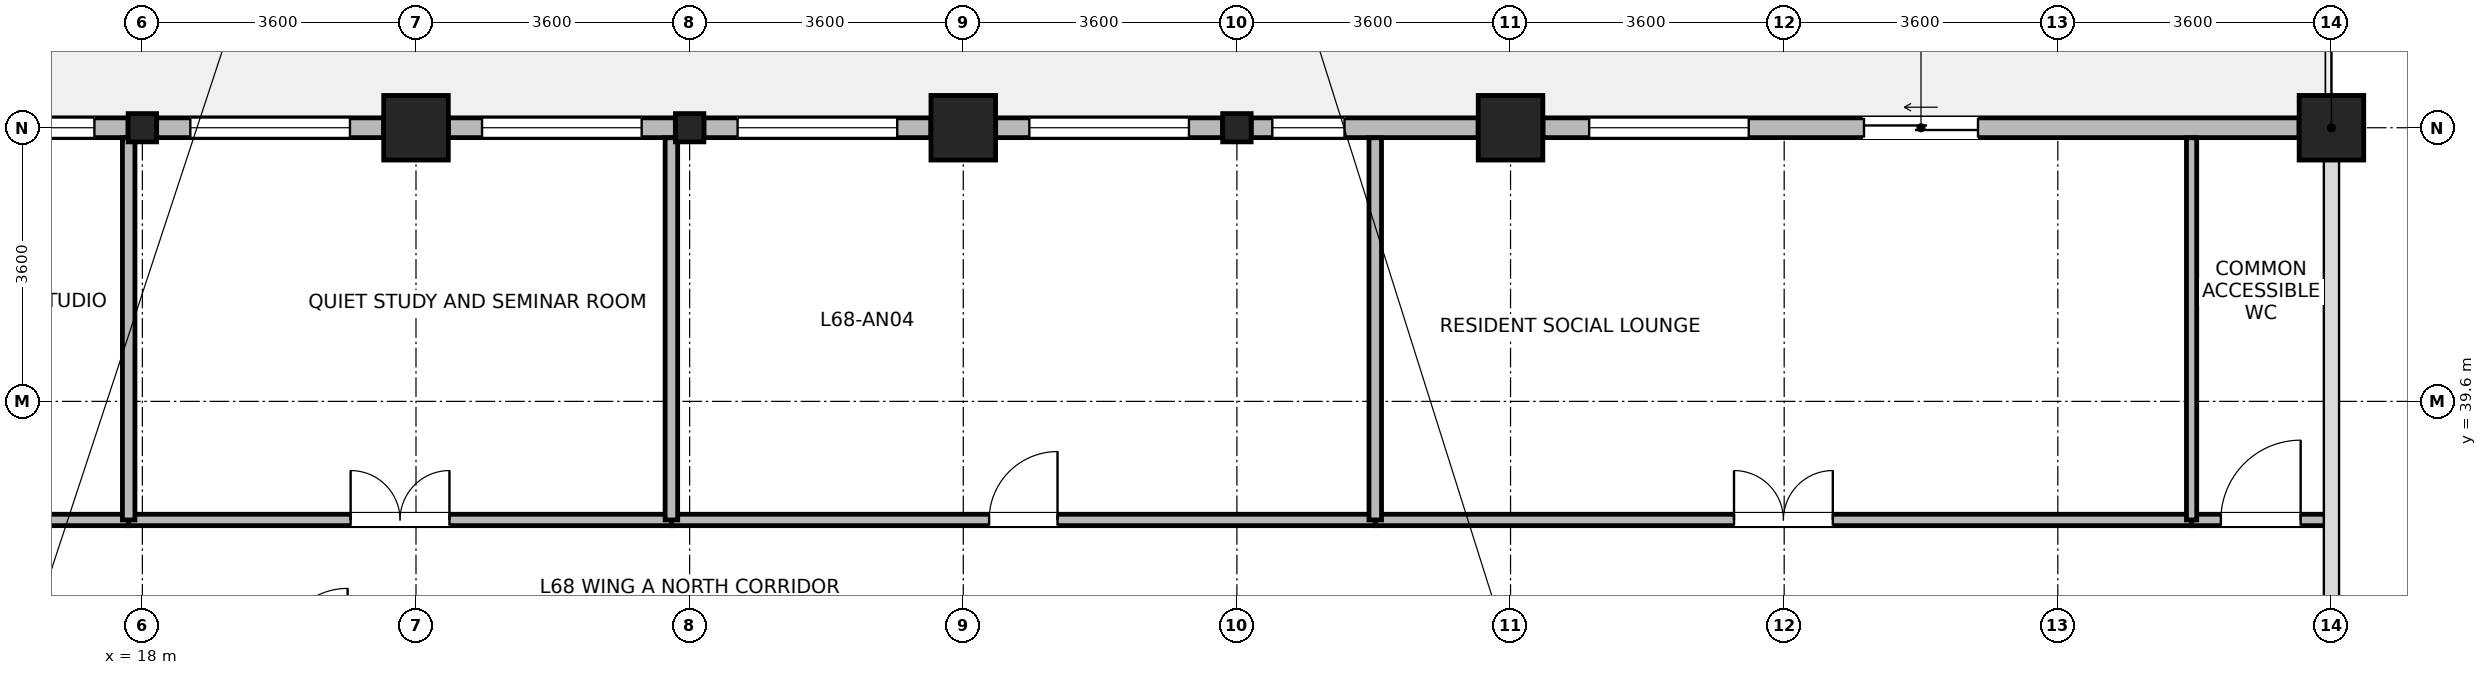
"""IFC4 building model, lengths in metres.
Left out: names, types, materials, properties, quantities, classifications, styles, units other than length and angle.
Written with IfcOpenShell. Run it as: python <this file> out.ifc"""

import sys

from ifc_helpers import new_model, si_unit, direction, frame, frame_2d, origin, origin_2d, place, context, subcontext, project, spatial, rectangle, i_section, extrude, source, transform, mapped, element, fill, save


model = new_model("IFC4")
c1 = context("Model", 3, precision=1e-05, world=origin(), true_north=direction((0.0, 1.0)))
c2 = subcontext(c1, "Body", "Model", "MODEL_VIEW")
j1 = project(units=[si_unit("LENGTHUNIT", "METRE"), si_unit("PLANEANGLEUNIT", "RADIAN")], contexts=[c1])
p1 = place(None, origin())
s1 = spatial("IfcSite", under=j1, at=p1, CompositionType="ELEMENT")
p2 = place(p1, origin())
s2 = spatial("IfcBuilding", under=s1, at=p2, CompositionType="ELEMENT")
p3 = place(p2, frame((0.0, 0.0, 264.7)))
s3 = spatial("IfcBuildingStorey", under=s2, at=p3, CompositionType="ELEMENT", Elevation=264.7)
m1 = source(origin(), c2, "Body", "SweptSolid", [
    extrude(rectangle(XDim=0.85, YDim=0.85, at=origin_2d()), origin(), (0.0, 0.0, 1.0), 3.7),
])
for number, where, z_axis, x_axis in (
    (1, (21.6, 43.2, 0.0), (0.0, 0.0, 1.0), (1.0, 0.0, 0.0)),
    (2, (28.8, 43.2, 0.0), (0.0, 0.0, 1.0), (1.0, 0.0, 0.0)),
    (3, (36.0, 43.2, 0.0), (0.0, 0.0, 1.0), (1.0, 0.0, 0.0)),
    (4, (46.8, 43.2, 0.0), (0.0, 0.0, 1.0), (1.0, 0.0, 0.0)),
):
    element("IfcColumn", number, at=place(p3, frame(where, z_axis=z_axis, x_axis=x_axis)), inside=s3, PredefinedType="COLUMN", context=c2, shape_type="MappedRepresentation", body=[
        mapped(m1, transform((0.0, 0.0, 0.0), x_axis=(1.0, 0.0, 0.0), y_axis=(0.0, 1.0, 0.0), z_axis=(0.0, 0.0, 1.0), scale=1.0)),
    ])
m2 = source(origin(), c2, "Body", "SweptSolid", [
    extrude(i_section(OverallWidth=0.374, OverallDepth=0.372, WebThickness=0.015, FlangeThickness=0.026, FilletRadius=0.015, at=origin_2d()), origin(), (0.0, 0.0, 1.0), 3.7),
])
for number, where, z_axis, x_axis in (
    (5, (18.0, 43.2, 0.0), (0.0, 0.0, 1.0), (1.0, 0.0, 0.0)),
    (6, (25.2, 43.2, 0.0), (0.0, 0.0, 1.0), (1.0, 0.0, 0.0)),
    (7, (32.4, 43.2, 0.0), (0.0, 0.0, 1.0), (1.0, 0.0, 0.0)),
):
    element("IfcColumn", number, at=place(p3, frame(where, z_axis=z_axis, x_axis=x_axis)), inside=s3, PredefinedType="COLUMN", context=c2, shape_type="MappedRepresentation", body=[
        mapped(m2, transform((0.0, 0.0, 0.0), x_axis=(1.0, 0.0, 0.0), y_axis=(0.0, 1.0, 0.0), z_axis=(0.0, 0.0, 1.0), scale=1.0)),
    ])
p4 = place(p3, frame((36.426, 43.2, 0.0), z_axis=(0.0, 0.0, 1.0), x_axis=(1.0, 0.0, 0.0)))
e8 = element("IfcWall", 8, at=p4, inside=s3, PredefinedType="STANDARD", context=c2, shape_type="SweptSolid", body=[
    extrude(rectangle(XDim=9.948, YDim=0.26, at=frame_2d((4.974, 0.0))), origin(), (0.0, 0.0, 1.0), 3.055),
])
p5 = place(p4, frame((4.224, 0.0, 0.0)))
e9 = element("IfcOpeningElement", 9, at=p5, cuts=e8, PredefinedType="OPENING", context=c2, shape_type="SweptSolid", body=[
    extrude(rectangle(XDim=1.5, YDim=2.15, at=frame_2d((0.75, 1.075))), frame((0.0, 0.14, 0.0), z_axis=(0.0, -1.0, 0.0), x_axis=(1.0, 0.0, 0.0)), (0.0, 0.0, 1.0), 0.28),
])
p6 = place(p4, frame((0.608, 0.0, 0.85)))
e10 = element("IfcOpeningElement", 10, at=p6, cuts=e8, PredefinedType="OPENING", context=c2, shape_type="SweptSolid", body=[
    extrude(rectangle(XDim=2.1, YDim=1.95, at=frame_2d((1.05, 0.975))), frame((0.0, 0.14, 0.0), z_axis=(0.0, -1.0, 0.0), x_axis=(1.0, 0.0, 0.0)), (0.0, 0.0, 1.0), 0.28),
])
p7 = place(p3, frame((32.588, 43.2, 0.0), z_axis=(0.0, 0.0, 1.0), x_axis=(1.0, 0.0, 0.0)))
e11 = element("IfcWall", 11, at=p7, inside=s3, PredefinedType="STANDARD", context=c2, shape_type="SweptSolid", body=[
    extrude(rectangle(XDim=2.986, YDim=0.26, at=frame_2d((1.493, 0.0))), origin(), (0.0, 0.0, 1.0), 3.055),
])
p8 = place(p7, frame((0.278, 0.0, 0.85)))
e12 = element("IfcOpeningElement", 12, at=p8, cuts=e11, PredefinedType="OPENING", context=c2, shape_type="SweptSolid", body=[
    extrude(rectangle(XDim=0.95, YDim=1.75, at=frame_2d((0.475, 0.875))), frame((0.0, 0.14, 0.0), z_axis=(0.0, -1.0, 0.0), x_axis=(1.0, 0.0, 0.0)), (0.0, 0.0, 1.0), 0.28),
])
p9 = place(p3, frame((29.226, 43.2, 0.0), z_axis=(0.0, 0.0, 1.0), x_axis=(1.0, 0.0, 0.0)))
e13 = element("IfcWall", 13, at=p9, inside=s3, PredefinedType="STANDARD", context=c2, shape_type="SweptSolid", body=[
    extrude(rectangle(XDim=2.986, YDim=0.26, at=frame_2d((1.493, 0.0))), origin(), (0.0, 0.0, 1.0), 3.055),
])
p10 = place(p9, frame((0.443, 0.0, 0.85)))
e14 = element("IfcOpeningElement", 14, at=p10, cuts=e13, PredefinedType="OPENING", context=c2, shape_type="SweptSolid", body=[
    extrude(rectangle(XDim=2.1, YDim=1.95, at=frame_2d((1.05, 0.975))), frame((0.0, 0.14, 0.0), z_axis=(0.0, -1.0, 0.0), x_axis=(1.0, 0.0, 0.0)), (0.0, 0.0, 1.0), 0.28),
])
p11 = place(p3, frame((25.388, 43.2, 0.0), z_axis=(0.0, 0.0, 1.0), x_axis=(1.0, 0.0, 0.0)))
e15 = element("IfcWall", 15, at=p11, inside=s3, PredefinedType="STANDARD", context=c2, shape_type="SweptSolid", body=[
    extrude(rectangle(XDim=2.986, YDim=0.26, at=frame_2d((1.493, 0.0))), origin(), (0.0, 0.0, 1.0), 3.055),
])
p12 = place(p11, frame((0.443, 0.0, 0.85)))
e16 = element("IfcOpeningElement", 16, at=p12, cuts=e15, PredefinedType="OPENING", context=c2, shape_type="SweptSolid", body=[
    extrude(rectangle(XDim=2.1, YDim=1.95, at=frame_2d((1.05, 0.975))), frame((0.0, 0.14, 0.0), z_axis=(0.0, -1.0, 0.0), x_axis=(1.0, 0.0, 0.0)), (0.0, 0.0, 1.0), 0.28),
])
p13 = place(p3, frame((22.026, 43.2, 0.0), z_axis=(0.0, 0.0, 1.0), x_axis=(1.0, 0.0, 0.0)))
e17 = element("IfcWall", 17, at=p13, inside=s3, PredefinedType="STANDARD", context=c2, shape_type="SweptSolid", body=[
    extrude(rectangle(XDim=2.986, YDim=0.26, at=frame_2d((1.493, 0.0))), origin(), (0.0, 0.0, 1.0), 3.055),
])
p14 = place(p13, frame((0.443, 0.0, 0.85)))
e18 = element("IfcOpeningElement", 18, at=p14, cuts=e17, PredefinedType="OPENING", context=c2, shape_type="SweptSolid", body=[
    extrude(rectangle(XDim=2.1, YDim=1.95, at=frame_2d((1.05, 0.975))), frame((0.0, 0.14, 0.0), z_axis=(0.0, -1.0, 0.0), x_axis=(1.0, 0.0, 0.0)), (0.0, 0.0, 1.0), 0.28),
])
p15 = place(p3, frame((18.188, 43.2, 0.0), z_axis=(0.0, 0.0, 1.0), x_axis=(1.0, 0.0, 0.0)))
e19 = element("IfcWall", 19, at=p15, inside=s3, PredefinedType="STANDARD", context=c2, shape_type="SweptSolid", body=[
    extrude(rectangle(XDim=2.986, YDim=0.26, at=frame_2d((1.493, 0.0))), origin(), (0.0, 0.0, 1.0), 3.055),
])
p16 = place(p15, frame((0.443, 0.0, 0.85)))
e20 = element("IfcOpeningElement", 20, at=p16, cuts=e19, PredefinedType="OPENING", context=c2, shape_type="SweptSolid", body=[
    extrude(rectangle(XDim=2.1, YDim=1.95, at=frame_2d((1.05, 0.975))), frame((0.0, 0.14, 0.0), z_axis=(0.0, -1.0, 0.0), x_axis=(1.0, 0.0, 0.0)), (0.0, 0.0, 1.0), 0.28),
])
p17 = place(p3, frame((14.826, 43.2, 0.0), z_axis=(0.0, 0.0, 1.0), x_axis=(1.0, 0.0, 0.0)))
e21 = element("IfcWall", 21, at=p17, inside=s3, PredefinedType="STANDARD", context=c2, shape_type="SweptSolid", body=[
    extrude(rectangle(XDim=2.986, YDim=0.26, at=frame_2d((1.493, 0.0))), origin(), (0.0, 0.0, 1.0), 3.055),
])
p18 = place(p17, frame((0.443, 0.0, 0.85)))
e22 = element("IfcOpeningElement", 22, at=p18, cuts=e21, PredefinedType="OPENING", context=c2, shape_type="SweptSolid", body=[
    extrude(rectangle(XDim=2.1, YDim=1.95, at=frame_2d((1.05, 0.975))), frame((0.0, 0.14, 0.0), z_axis=(0.0, -1.0, 0.0), x_axis=(1.0, 0.0, 0.0)), (0.0, 0.0, 1.0), 0.28),
])
p19 = place(p3, frame((34.22, 38.04, 0.0), z_axis=(0.0, 0.0, 1.0), x_axis=(1.0, 0.0, 0.0)))
e23 = element("IfcWall", 23, at=p19, inside=s3, PredefinedType="PARTITIONING", context=c2, shape_type="SweptSolid", body=[
    extrude(rectangle(XDim=10.74, YDim=0.15, at=frame_2d((5.37, 0.0))), origin(), (0.0, 0.0, 1.0), 3.455),
])
p20 = place(p19, frame((4.72, 0.0, 0.0)))
e24 = element("IfcOpeningElement", 24, at=p20, cuts=e23, PredefinedType="OPENING", context=c2, shape_type="SweptSolid", body=[
    extrude(rectangle(XDim=1.3, YDim=2.12, at=frame_2d((0.65, 1.06))), frame((0.0, 0.085, 0.0), z_axis=(0.0, -1.0, 0.0), x_axis=(1.0, 0.0, 0.0)), (0.0, 0.0, 1.0), 0.17),
])
p21 = place(p3, frame((24.96, 38.04, 0.0), z_axis=(0.0, 0.0, 1.0), x_axis=(1.0, 0.0, 0.0)))
e25 = element("IfcWall", 25, at=p21, inside=s3, PredefinedType="PARTITIONING", context=c2, shape_type="SweptSolid", body=[
    extrude(rectangle(XDim=9.26, YDim=0.15, at=frame_2d((4.63, 0.0))), origin(), (0.0, 0.0, 1.0), 3.455),
])
p22 = place(p21, frame((4.18, 0.0, 0.0)))
e26 = element("IfcOpeningElement", 26, at=p22, cuts=e25, PredefinedType="OPENING", context=c2, shape_type="SweptSolid", body=[
    extrude(rectangle(XDim=0.9, YDim=2.08, at=frame_2d((0.45, 1.04))), frame((0.0, 0.085, 0.0), z_axis=(0.0, -1.0, 0.0), x_axis=(1.0, 0.0, 0.0)), (0.0, 0.0, 1.0), 0.17),
])
p23 = place(p3, frame((10.12, 38.04, 0.0), z_axis=(0.0, 0.0, 1.0), x_axis=(1.0, 0.0, 0.0)))
e27 = element("IfcWall", 27, at=p23, inside=s3, PredefinedType="PARTITIONING", context=c2, shape_type="SweptSolid", body=[
    extrude(rectangle(XDim=7.7, YDim=0.15, at=frame_2d((3.85, 0.0))), origin(), (0.0, 0.0, 1.0), 3.455),
])
p24 = place(p23, frame((3.325, 0.0, 0.0)))
e28 = element("IfcOpeningElement", 28, at=p24, cuts=e27, PredefinedType="OPENING", context=c2, shape_type="SweptSolid", body=[
    extrude(rectangle(XDim=1.05, YDim=2.12, at=frame_2d((0.525, 1.06))), frame((0.0, 0.085, 0.0), z_axis=(0.0, -1.0, 0.0), x_axis=(1.0, 0.0, 0.0)), (0.0, 0.0, 1.0), 0.17),
])
p25 = place(p3, frame((17.82, 38.04, 0.0), z_axis=(0.0, 0.0, 1.0), x_axis=(1.0, 0.0, 0.0)))
e29 = element("IfcWall", 29, at=p25, inside=s3, PredefinedType="PARTITIONING", context=c2, shape_type="SweptSolid", body=[
    extrude(rectangle(XDim=7.14, YDim=0.15, at=frame_2d((3.57, 0.0))), origin(), (0.0, 0.0, 1.0), 3.455),
])
p26 = place(p25, frame((2.92, 0.0, 0.0)))
e30 = element("IfcOpeningElement", 30, at=p26, cuts=e29, PredefinedType="OPENING", context=c2, shape_type="SweptSolid", body=[
    extrude(rectangle(XDim=1.3, YDim=2.12, at=frame_2d((0.65, 1.06))), frame((0.0, 0.085, 0.0), z_axis=(0.0, -1.0, 0.0), x_axis=(1.0, 0.0, 0.0)), (0.0, 0.0, 1.0), 0.17),
])
p27 = place(p3, frame((44.96, 38.04, 0.0), z_axis=(0.0, 0.0, 1.0), x_axis=(1.0, 0.0, 0.0)))
e31 = element("IfcWall", 31, at=p27, inside=s3, PredefinedType="PARTITIONING", context=c2, shape_type="SweptSolid", body=[
    extrude(rectangle(XDim=1.82, YDim=0.15, at=frame_2d((0.91, 0.0))), origin(), (0.0, 0.0, 1.0), 3.455),
])
p28 = place(p27, frame((0.385, 0.0, 0.0)))
e32 = element("IfcOpeningElement", 32, at=p28, cuts=e31, PredefinedType="OPENING", context=c2, shape_type="SweptSolid", body=[
    extrude(rectangle(XDim=1.05, YDim=2.12, at=frame_2d((0.525, 1.06))), frame((0.0, 0.085, 0.0), z_axis=(0.0, -1.0, 0.0), x_axis=(1.0, 0.0, 0.0)), (0.0, 0.0, 1.0), 0.17),
])
p29 = place(p3, frame((17.82, 38.04, 0.0), z_axis=(0.0, 0.0, 1.0), x_axis=(0.0, 1.0, 0.0)))
e33 = element("IfcWall", 33, at=p29, inside=s3, PredefinedType="PARTITIONING", context=c2, shape_type="SweptSolid", body=[
    extrude(rectangle(XDim=5.028, YDim=0.165, at=frame_2d((2.514, 0.0))), origin(), (0.0, 0.0, 1.0), 3.185),
])
for number, where, z_axis, x_axis in (
    (34, (24.96, 38.04, 0.0), (0.0, 0.0, 1.0), (0.0, 1.0, 0.0)),
    (35, (34.22, 38.04, 0.0), (0.0, 0.0, 1.0), (0.0, 1.0, 0.0)),
):
    element("IfcWall", number, at=place(p3, frame(where, z_axis=z_axis, x_axis=x_axis)), inside=s3, PredefinedType="PARTITIONING", context=c2, shape_type="SweptSolid", body=[
        extrude(rectangle(XDim=5.028, YDim=0.165, at=frame_2d((2.514, 0.0))), origin(), (0.0, 0.0, 1.0), 3.455),
    ])
p30 = place(p3, frame((44.96, 38.04, 0.0), z_axis=(0.0, 0.0, 1.0), x_axis=(0.0, 1.0, 0.0)))
e36 = element("IfcWall", 36, at=p30, inside=s3, PredefinedType="PARTITIONING", context=c2, shape_type="SweptSolid", body=[
    extrude(rectangle(XDim=5.028, YDim=0.135, at=frame_2d((2.514, 0.0))), origin(), (0.0, 0.0, 1.0), 3.455),
])
p31 = place(p5, origin())
e37 = element("IfcDoor", 37, at=p31, inside=s3, OperationType="SLIDING_TO_LEFT", PredefinedType="DOOR", context=c2, shape_type="SweptSolid", body=[
    extrude(rectangle(XDim=1.5, YDim=2.15, at=frame_2d((0.75, 1.075))), frame((0.0, 0.025, 0.0), z_axis=(0.0, -1.0, 0.0), x_axis=(1.0, 0.0, 0.0)), (0.0, 0.0, 1.0), 0.05),
])
fill(e9, e37)
p32 = place(p6, origin())
e38 = element("IfcWindow", 38, at=p32, inside=s3, PartitioningType="SINGLE_PANEL", PredefinedType="WINDOW", context=c2, shape_type="SweptSolid", body=[
    extrude(rectangle(XDim=2.1, YDim=1.95, at=frame_2d((1.05, 0.975))), frame((0.0, 0.03, 0.0), z_axis=(0.0, -1.0, 0.0), x_axis=(1.0, 0.0, 0.0)), (0.0, 0.0, 1.0), 0.06),
])
fill(e10, e38)
p33 = place(p8, origin())
e39 = element("IfcWindow", 39, at=p33, inside=s3, PartitioningType="SINGLE_PANEL", PredefinedType="WINDOW", context=c2, shape_type="SweptSolid", body=[
    extrude(rectangle(XDim=0.95, YDim=1.75, at=frame_2d((0.475, 0.875))), frame((0.0, 0.03, 0.0), z_axis=(0.0, -1.0, 0.0), x_axis=(1.0, 0.0, 0.0)), (0.0, 0.0, 1.0), 0.06),
])
fill(e12, e39)
p34 = place(p10, origin())
e40 = element("IfcWindow", 40, at=p34, inside=s3, PartitioningType="SINGLE_PANEL", PredefinedType="WINDOW", context=c2, shape_type="SweptSolid", body=[
    extrude(rectangle(XDim=2.1, YDim=1.95, at=frame_2d((1.05, 0.975))), frame((0.0, 0.03, 0.0), z_axis=(0.0, -1.0, 0.0), x_axis=(1.0, 0.0, 0.0)), (0.0, 0.0, 1.0), 0.06),
])
fill(e14, e40)
p35 = place(p12, origin())
e41 = element("IfcWindow", 41, at=p35, inside=s3, PartitioningType="SINGLE_PANEL", PredefinedType="WINDOW", context=c2, shape_type="SweptSolid", body=[
    extrude(rectangle(XDim=2.1, YDim=1.95, at=frame_2d((1.05, 0.975))), frame((0.0, 0.03, 0.0), z_axis=(0.0, -1.0, 0.0), x_axis=(1.0, 0.0, 0.0)), (0.0, 0.0, 1.0), 0.06),
])
fill(e16, e41)
p36 = place(p14, origin())
e42 = element("IfcWindow", 42, at=p36, inside=s3, PartitioningType="SINGLE_PANEL", PredefinedType="WINDOW", context=c2, shape_type="SweptSolid", body=[
    extrude(rectangle(XDim=2.1, YDim=1.95, at=frame_2d((1.05, 0.975))), frame((0.0, 0.03, 0.0), z_axis=(0.0, -1.0, 0.0), x_axis=(1.0, 0.0, 0.0)), (0.0, 0.0, 1.0), 0.06),
])
fill(e18, e42)
p37 = place(p16, origin())
e43 = element("IfcWindow", 43, at=p37, inside=s3, PartitioningType="SINGLE_PANEL", PredefinedType="WINDOW", context=c2, shape_type="SweptSolid", body=[
    extrude(rectangle(XDim=2.1, YDim=1.95, at=frame_2d((1.05, 0.975))), frame((0.0, 0.03, 0.0), z_axis=(0.0, -1.0, 0.0), x_axis=(1.0, 0.0, 0.0)), (0.0, 0.0, 1.0), 0.06),
])
fill(e20, e43)
p38 = place(p18, origin())
e44 = element("IfcWindow", 44, at=p38, inside=s3, PartitioningType="SINGLE_PANEL", PredefinedType="WINDOW", context=c2, shape_type="SweptSolid", body=[
    extrude(rectangle(XDim=2.1, YDim=1.95, at=frame_2d((1.05, 0.975))), frame((0.0, 0.03, 0.0), z_axis=(0.0, -1.0, 0.0), x_axis=(1.0, 0.0, 0.0)), (0.0, 0.0, 1.0), 0.06),
])
fill(e22, e44)
p39 = place(p20, origin())
e45 = element("IfcDoor", 45, at=p39, inside=s3, OperationType="DOUBLE_DOOR_SINGLE_SWING", PredefinedType="DOOR", context=c2, shape_type="SweptSolid", body=[
    extrude(rectangle(XDim=1.3, YDim=2.12, at=frame_2d((0.65, 1.06))), frame((0.0, 0.025, 0.0), z_axis=(0.0, -1.0, 0.0), x_axis=(1.0, 0.0, 0.0)), (0.0, 0.0, 1.0), 0.05),
])
fill(e24, e45)
p40 = place(p22, origin())
e46 = element("IfcDoor", 46, at=p40, inside=s3, OperationType="SINGLE_SWING_RIGHT", PredefinedType="DOOR", context=c2, shape_type="SweptSolid", body=[
    extrude(rectangle(XDim=0.9, YDim=2.08, at=frame_2d((0.45, 1.04))), frame((0.0, 0.025, 0.0), z_axis=(0.0, -1.0, 0.0), x_axis=(1.0, 0.0, 0.0)), (0.0, 0.0, 1.0), 0.05),
])
fill(e26, e46)
p41 = place(p26, origin())
e47 = element("IfcDoor", 47, at=p41, inside=s3, OperationType="DOUBLE_DOOR_SINGLE_SWING", PredefinedType="DOOR", context=c2, shape_type="SweptSolid", body=[
    extrude(rectangle(XDim=1.3, YDim=2.12, at=frame_2d((0.65, 1.06))), frame((0.0, 0.025, 0.0), z_axis=(0.0, -1.0, 0.0), x_axis=(1.0, 0.0, 0.0)), (0.0, 0.0, 1.0), 0.05),
])
fill(e30, e47)
p42 = place(p28, origin())
e48 = element("IfcDoor", 48, at=p42, inside=s3, OperationType="SINGLE_SWING_RIGHT", PredefinedType="DOOR", context=c2, shape_type="SweptSolid", body=[
    extrude(rectangle(XDim=1.05, YDim=2.12, at=frame_2d((0.525, 1.06))), frame((0.0, 0.025, 0.0), z_axis=(0.0, -1.0, 0.0), x_axis=(1.0, 0.0, 0.0)), (0.0, 0.0, 1.0), 0.05),
])
fill(e32, e48)
save(model, sys.argv[1])
